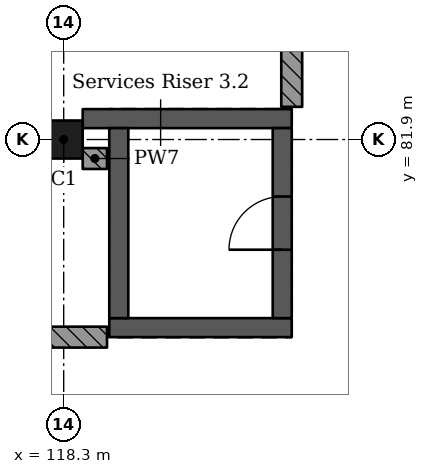
"""IFC4 building model, lengths in metres.
Left out: names, types, materials, properties, quantities, classifications, styles, units other than length and angle.
Written with IfcOpenShell. Run it as: python <this file> out.ifc"""

import sys

from ifc_helpers import new_model, si_unit, direction, frame, frame_2d, origin, origin_2d, place, context, subcontext, project, spatial, rectangle, extrude, element, fill, save


model = new_model("IFC4")
c1 = context("Model", 3, precision=1e-05, world=origin(), true_north=direction((0.0, 1.0)))
c2 = subcontext(c1, "Body", "Model", "MODEL_VIEW")
j1 = project(units=[si_unit("LENGTHUNIT", "METRE"), si_unit("PLANEANGLEUNIT", "RADIAN")], contexts=[c1])
p1 = place(None, origin())
s1 = spatial("IfcSite", under=j1, at=p1, CompositionType="ELEMENT")
p2 = place(p1, origin())
s2 = spatial("IfcBuilding", under=s1, at=p2, CompositionType="ELEMENT")
p3 = place(p2, frame((0.0, 0.0, 29.12)))
s3 = spatial("IfcBuildingStorey", under=s2, at=p3, CompositionType="ELEMENT", Elevation=29.12)
p4 = place(p3, frame((118.3, 81.9, 0.0), z_axis=(0.0, 0.0, 1.0), x_axis=(1.0, 0.0, 0.0)))
e1 = element("IfcColumn", 1, at=p4, inside=s3, PredefinedType="COLUMN", context=c2, shape_type="SweptSolid", body=[
    extrude(rectangle(XDim=0.5, YDim=0.5, at=origin_2d()), origin(), (0.0, 0.0, 1.0), 4.55),
])
p5 = place(p3, frame((121.3, 79.425, 0.0), z_axis=(0.0, 0.0, 1.0), x_axis=(-1.0, 0.0, 0.0)))
e2 = element("IfcWall", 2, at=p5, inside=s3, PredefinedType="SHEAR", context=c2, shape_type="SweptSolid", body=[
    extrude(rectangle(XDim=2.4, YDim=0.25, at=frame_2d((1.2, 0.0))), origin(), (0.0, 0.0, 1.0), 4.55),
])
p6 = place(p3, frame((121.3, 82.175, 0.0), z_axis=(0.0, 0.0, 1.0), x_axis=(-1.0, 0.0, 0.0)))
e3 = element("IfcWall", 3, at=p6, inside=s3, PredefinedType="SHEAR", context=c2, shape_type="SweptSolid", body=[
    extrude(rectangle(XDim=2.75, YDim=0.25, at=frame_2d((1.375, 0.0))), origin(), (0.0, 0.0, 1.0), 4.55),
])
p7 = place(p3, frame((119.025, 82.05, 0.0), z_axis=(0.0, 0.0, 1.0), x_axis=(0.0, -1.0, 0.0)))
e4 = element("IfcWall", 4, at=p7, inside=s3, PredefinedType="SHEAR", context=c2, shape_type="SweptSolid", body=[
    extrude(rectangle(XDim=2.5, YDim=0.25, at=frame_2d((1.25, 0.0))), origin(), (0.0, 0.0, 1.0), 4.55),
])
p8 = place(p3, frame((121.175, 82.05, 0.0), z_axis=(0.0, 0.0, 1.0), x_axis=(0.0, -1.0, 0.0)))
e5 = element("IfcWall", 5, at=p8, inside=s3, PredefinedType="SHEAR", context=c2, shape_type="SweptSolid", body=[
    extrude(rectangle(XDim=2.5, YDim=0.25, at=frame_2d((1.25, 0.0))), origin(), (0.0, 0.0, 1.0), 4.55),
])
p9 = place(p8, frame((0.9, 0.0, 0.0)))
e6 = element("IfcOpeningElement", 6, at=p9, cuts=e5, PredefinedType="OPENING", context=c2, shape_type="SweptSolid", body=[
    extrude(rectangle(XDim=0.7, YDim=2.1, at=frame_2d((0.35, 1.05))), frame((0.0, 0.135, 0.0), z_axis=(0.0, -1.0, 0.0), x_axis=(1.0, 0.0, 0.0)), (0.0, 0.0, 1.0), 0.27),
])
p10 = place(p3, frame((112.062, 79.3, 0.0), z_axis=(0.0, 0.0, 1.0), x_axis=(1.0, 0.0, 0.0)))
e7 = element("IfcWall", 7, at=p10, inside=s3, PredefinedType="SOLIDWALL", context=c2, shape_type="SweptSolid", body=[
    extrude(rectangle(XDim=6.808, YDim=0.275, at=frame_2d((3.404, 0.0))), origin(), (0.0, 0.0, 1.0), 3.88),
])
p11 = place(p3, frame((118.55, 81.65, 0.0), z_axis=(0.0, 0.0, 1.0), x_axis=(1.0, 0.0, 0.0)))
e8 = element("IfcWall", 8, at=p11, inside=s3, PredefinedType="SOLIDWALL", context=c2, shape_type="SweptSolid", body=[
    extrude(rectangle(XDim=0.32, YDim=0.275, at=frame_2d((0.16, 0.0))), origin(), (0.0, 0.0, 1.0), 3.88),
])
p12 = place(p3, frame((121.3, 82.33, 0.0), z_axis=(0.0, 0.0, 1.0), x_axis=(0.0, 1.0, 0.0)))
e9 = element("IfcWall", 9, at=p12, inside=s3, PredefinedType="SOLIDWALL", context=c2, shape_type="SweptSolid", body=[
    extrude(rectangle(XDim=6.932, YDim=0.275, at=frame_2d((3.466, 0.0))), origin(), (0.0, 0.0, 1.0), 3.88),
])
p13 = place(p9, origin())
e10 = element("IfcDoor", 10, at=p13, inside=s3, OperationType="SINGLE_SWING_RIGHT", PredefinedType="DOOR", context=c2, shape_type="SweptSolid", body=[
    extrude(rectangle(XDim=0.7, YDim=2.1, at=frame_2d((0.35, 1.05))), frame((0.0, 0.025, 0.0), z_axis=(0.0, -1.0, 0.0), x_axis=(1.0, 0.0, 0.0)), (0.0, 0.0, 1.0), 0.05),
])
fill(e6, e10)
save(model, sys.argv[1])
